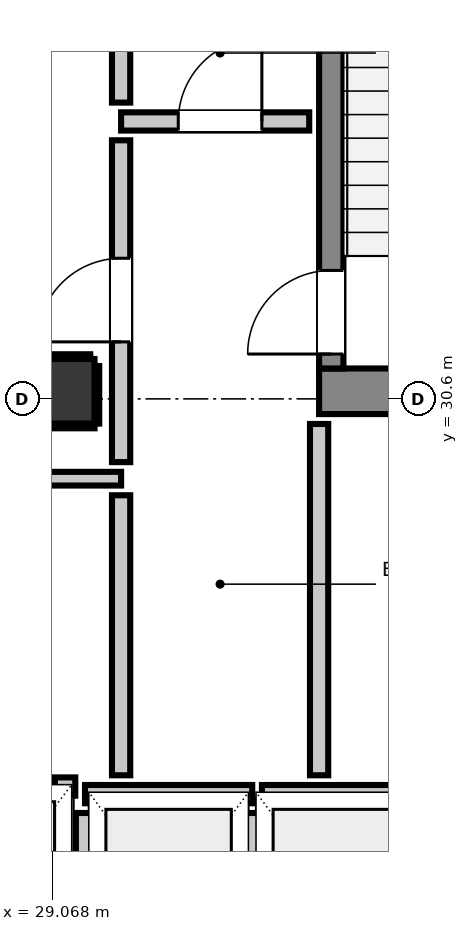
"""IFC4 building model, lengths in metres.
Left out: names, types, materials, properties, quantities, classifications, styles, units other than length and angle.
Written with IfcOpenShell. Run it as: python <this file> out.ifc"""

import sys

from ifc_helpers import new_model, si_unit, direction, frame, frame_2d, origin, origin_2d, place, context, subcontext, project, spatial, rectangle, extrude, element, fill, save


model = new_model("IFC4")
c1 = context("Model", 3, precision=1e-05, world=origin(), true_north=direction((0.0, 1.0)))
c2 = subcontext(c1, "Body", "Model", "MODEL_VIEW")
j1 = project(units=[si_unit("LENGTHUNIT", "METRE"), si_unit("PLANEANGLEUNIT", "RADIAN")], contexts=[c1])
p1 = place(None, origin())
s1 = spatial("IfcSite", under=j1, at=p1, CompositionType="ELEMENT")
p2 = place(p1, origin())
s2 = spatial("IfcBuilding", under=s1, at=p2, CompositionType="ELEMENT")
p3 = place(p2, frame((0.0, 0.0, 254.52)))
s3 = spatial("IfcBuildingStorey", under=s2, at=p3, CompositionType="ELEMENT", Elevation=254.52)
p4 = place(p3, frame((32.58, 30.7, 0.0), z_axis=(0.0, 0.0, 1.0), x_axis=(1.0, 0.0, 0.0)))
e1 = element("IfcWall", 1, at=p4, inside=s3, PredefinedType="SHEAR", context=c2, shape_type="SweptSolid", body=[
    extrude(rectangle(XDim=3.54, YDim=0.6, at=frame_2d((1.77, 0.0))), origin(), (0.0, 0.0, 1.0), 3.32),
])
p5 = place(p3, frame((32.74, 31.0, 0.0), z_axis=(0.0, 0.0, 1.0), x_axis=(0.0, 1.0, 0.0)))
e2 = element("IfcWall", 2, at=p5, inside=s3, PredefinedType="SHEAR", context=c2, shape_type="SweptSolid", body=[
    extrude(rectangle(XDim=7.8, YDim=0.32, at=frame_2d((3.9, 0.0))), origin(), (0.0, 0.0, 1.0), 3.32),
])
p6 = place(p5, frame((0.19, 0.0, 0.0)))
e3 = element("IfcOpeningElement", 3, at=p6, cuts=e2, PredefinedType="OPENING", context=c2, shape_type="SweptSolid", body=[
    extrude(rectangle(XDim=1.1, YDim=2.15, at=frame_2d((0.55, 1.075))), frame((0.0, 0.17, 0.0), z_axis=(0.0, -1.0, 0.0), x_axis=(1.0, 0.0, 0.0)), (0.0, 0.0, 1.0), 0.34),
])
p7 = place(p3, frame((29.2, 30.7, 0.0), z_axis=(0.0, 0.0, 1.0), x_axis=(1.0, 0.0, 0.0)))
e4 = element("IfcColumn", 4, at=p7, inside=s3, PredefinedType="COLUMN", context=c2, shape_type="SweptSolid", body=[
    extrude(rectangle(XDim=0.85, YDim=0.85, at=origin_2d()), origin(), (0.0, 0.0, 1.0), 3.32),
])
p8 = place(p3, frame((29.5, 25.4, 0.0), z_axis=(0.0, 0.0, 1.0), x_axis=(1.0, 0.0, 0.0)))
e5 = element("IfcWall", 5, at=p8, inside=s3, PredefinedType="PARTITIONING", context=c2, shape_type="SweptSolid", body=[
    extrude(rectangle(XDim=2.2, YDim=0.24, at=frame_2d((1.1, 0.0))), origin(), (0.0, 0.0, 1.0), 2.96),
])
p9 = place(p3, frame((29.5, 22.848, 0.0), z_axis=(0.0, 0.0, 1.0), x_axis=(0.0, 1.0, 0.0)))
e6 = element("IfcWall", 6, at=p9, inside=s3, PredefinedType="PARTITIONING", context=c2, shape_type="SweptSolid", body=[
    extrude(rectangle(XDim=2.304, YDim=0.24, at=frame_2d((1.152, 0.0))), origin(), (0.0, 0.0, 1.0), 2.195),
])
p10 = place(p3, frame((31.7, 22.848, 0.0), z_axis=(0.0, 0.0, 1.0), x_axis=(0.0, 1.0, 0.0)))
e7 = element("IfcWall", 7, at=p10, inside=s3, PredefinedType="PARTITIONING", context=c2, shape_type="SweptSolid", body=[
    extrude(rectangle(XDim=2.304, YDim=0.24, at=frame_2d((1.152, 0.0))), origin(), (0.0, 0.0, 1.0), 2.96),
])
p11 = place(p3, frame((31.828, 25.4, 0.0), z_axis=(0.0, 0.0, 1.0), x_axis=(1.0, 0.0, 0.0)))
e8 = element("IfcWall", 8, at=p11, inside=s3, PredefinedType="PARTITIONING", context=c2, shape_type="SweptSolid", body=[
    extrude(rectangle(XDim=2.072, YDim=0.24, at=frame_2d((1.036, 0.0))), origin(), (0.0, 0.0, 1.0), 2.96),
])
p12 = place(p3, frame((29.103, 25.5, 0.0), z_axis=(0.0, 0.0, 1.0), x_axis=(1.0, 0.0, 0.0)))
e9 = element("IfcWall", 9, at=p12, inside=s3, PredefinedType="PARTITIONING", context=c2, shape_type="SweptSolid", body=[
    extrude(rectangle(XDim=0.269, YDim=0.24, at=frame_2d((0.135, 0.0))), origin(), (0.0, 0.0, 1.0), 2.96),
])
p13 = place(p3, frame((29.975, 34.25, 0.0), z_axis=(0.0, 0.0, 1.0), x_axis=(1.0, 0.0, 0.0)))
e10 = element("IfcWall", 10, at=p13, inside=s3, PredefinedType="PARTITIONING", context=c2, shape_type="SweptSolid", body=[
    extrude(rectangle(XDim=2.475, YDim=0.24, at=frame_2d((1.237, 0.0))), origin(), (0.0, 0.0, 1.0), 2.96),
])
p14 = place(p13, frame((0.752, 0.0, 0.0)))
e11 = element("IfcOpeningElement", 11, at=p14, cuts=e10, PredefinedType="OPENING", context=c2, shape_type="SweptSolid", body=[
    extrude(rectangle(XDim=1.1, YDim=2.15, at=frame_2d((0.55, 1.075))), frame((0.0, 0.13, 0.0), z_axis=(0.0, -1.0, 0.0), x_axis=(1.0, 0.0, 0.0)), (0.0, 0.0, 1.0), 0.26),
])
p15 = place(p3, frame((28.593, 29.55, 0.0), z_axis=(0.0, 0.0, 1.0), x_axis=(1.0, 0.0, 0.0)))
e12 = element("IfcWall", 12, at=p15, inside=s3, PredefinedType="PARTITIONING", context=c2, shape_type="SweptSolid", body=[
    extrude(rectangle(XDim=1.382, YDim=0.18, at=frame_2d((0.691, 0.0))), origin(), (0.0, 0.0, 1.0), 2.96),
])
p16 = place(p3, frame((29.975, 25.648, 0.0), z_axis=(0.0, 0.0, 1.0), x_axis=(0.0, 1.0, 0.0)))
e13 = element("IfcWall", 13, at=p16, inside=s3, PredefinedType="PARTITIONING", context=c2, shape_type="SweptSolid", body=[
    extrude(rectangle(XDim=3.684, YDim=0.24, at=frame_2d((1.842, 0.0))), origin(), (0.0, 0.0, 1.0), 2.96),
])
p17 = place(p3, frame((29.975, 29.768, 0.0), z_axis=(0.0, 0.0, 1.0), x_axis=(0.0, 1.0, 0.0)))
e14 = element("IfcWall", 14, at=p17, inside=s3, PredefinedType="PARTITIONING", context=c2, shape_type="SweptSolid", body=[
    extrude(rectangle(XDim=4.234, YDim=0.24, at=frame_2d((2.117, 0.0))), origin(), (0.0, 0.0, 1.0), 2.96),
])
p18 = place(p17, frame((1.582, 0.0, 0.0)))
e15 = element("IfcOpeningElement", 15, at=p18, cuts=e14, PredefinedType="OPENING", context=c2, shape_type="SweptSolid", body=[
    extrude(rectangle(XDim=1.1, YDim=2.15, at=frame_2d((0.55, 1.075))), frame((0.0, 0.13, 0.0), z_axis=(0.0, -1.0, 0.0), x_axis=(1.0, 0.0, 0.0)), (0.0, 0.0, 1.0), 0.26),
])
p19 = place(p3, frame((29.975, 34.498, 0.0), z_axis=(0.0, 0.0, 1.0), x_axis=(0.0, 1.0, 0.0)))
e16 = element("IfcWall", 16, at=p19, inside=s3, PredefinedType="PARTITIONING", context=c2, shape_type="SweptSolid", body=[
    extrude(rectangle(XDim=0.934, YDim=0.24, at=frame_2d((0.467, 0.0))), origin(), (0.0, 0.0, 1.0), 2.96),
])
p20 = place(p3, frame((32.58, 25.648, 0.0), z_axis=(0.0, 0.0, 1.0), x_axis=(0.0, 1.0, 0.0)))
e17 = element("IfcWall", 17, at=p20, inside=s3, PredefinedType="PARTITIONING", context=c2, shape_type="SweptSolid", body=[
    extrude(rectangle(XDim=4.622, YDim=0.24, at=frame_2d((2.311, 0.0))), origin(), (0.0, 0.0, 1.0), 2.96),
])
p21 = place(p3, frame((28.775, 30.243, 0.0), z_axis=(0.0, 0.0, 1.0), x_axis=(1.0, 0.0, 0.0)))
e18 = element("IfcWall", 18, at=p21, inside=s3, PredefinedType="PARTITIONING", context=c2, shape_type="SweptSolid", body=[
    extrude(rectangle(XDim=0.85, YDim=0.06, at=frame_2d((0.425, 0.0))), origin(), (0.0, 0.0, 1.0), 1.45),
])
p22 = place(p3, frame((28.775, 31.157, 0.0), z_axis=(0.0, 0.0, 1.0), x_axis=(1.0, 0.0, 0.0)))
e19 = element("IfcWall", 19, at=p22, inside=s3, PredefinedType="PARTITIONING", context=c2, shape_type="SweptSolid", body=[
    extrude(rectangle(XDim=0.794, YDim=0.06, at=frame_2d((0.397, 0.0))), origin(), (0.0, 0.0, 1.0), 1.45),
])
p23 = place(p3, frame((29.657, 30.275, 0.0), z_axis=(0.0, 0.0, 1.0), x_axis=(0.0, 1.0, 0.0)))
e20 = element("IfcWall", 20, at=p23, inside=s3, PredefinedType="PARTITIONING", context=c2, shape_type="SweptSolid", body=[
    extrude(rectangle(XDim=0.757, YDim=0.06, at=frame_2d((0.378, 0.0))), origin(), (0.0, 0.0, 1.0), 1.45),
])
p24 = place(p6, origin())
e21 = element("IfcDoor", 21, at=p24, inside=s3, OperationType="SINGLE_SWING_LEFT", PredefinedType="DOOR", context=c2, shape_type="SweptSolid", body=[
    extrude(rectangle(XDim=1.1, YDim=2.15, at=frame_2d((0.55, 1.075))), frame((0.0, 0.025, 0.0), z_axis=(0.0, -1.0, 0.0), x_axis=(1.0, 0.0, 0.0)), (0.0, 0.0, 1.0), 0.05),
])
fill(e3, e21)
p25 = place(p18, origin())
e22 = element("IfcDoor", 22, at=p25, inside=s3, OperationType="SINGLE_SWING_LEFT", PredefinedType="DOOR", context=c2, shape_type="SweptSolid", body=[
    extrude(rectangle(XDim=1.1, YDim=2.15, at=frame_2d((0.55, 1.075))), frame((0.0, 0.025, 0.0), z_axis=(0.0, -1.0, 0.0), x_axis=(1.0, 0.0, 0.0)), (0.0, 0.0, 1.0), 0.05),
])
fill(e15, e22)
p26 = place(p14, origin())
e23 = element("IfcDoor", 23, at=p26, inside=s3, OperationType="SINGLE_SWING_RIGHT", PredefinedType="DOOR", context=c2, shape_type="SweptSolid", body=[
    extrude(rectangle(XDim=1.1, YDim=2.15, at=frame_2d((0.55, 1.075))), frame((0.0, 0.025, 0.0), z_axis=(0.0, -1.0, 0.0), x_axis=(1.0, 0.0, 0.0)), (0.0, 0.0, 1.0), 0.05),
])
fill(e11, e23)
save(model, sys.argv[1])
